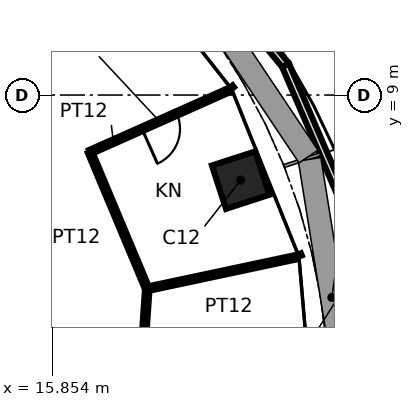
"""IFC4 building model, lengths in metres.
Left out: names, types, materials, properties, quantities, classifications, styles, units other than length and angle.
Written with IfcOpenShell. Run it as: python <this file> out.ifc"""

import sys

from ifc_helpers import new_model, si_unit, direction, frame, frame_2d, origin, origin_2d, place, context, subcontext, project, spatial, rectangle, extrude, element, fill, save


model = new_model("IFC4")
c1 = context("Model", 3, precision=1e-05, world=origin(), true_north=direction((0.0, 1.0)))
c2 = subcontext(c1, "Body", "Model", "MODEL_VIEW")
j1 = project(units=[si_unit("LENGTHUNIT", "METRE"), si_unit("PLANEANGLEUNIT", "RADIAN")], contexts=[c1])
p1 = place(None, origin())
s1 = spatial("IfcSite", under=j1, at=p1, CompositionType="ELEMENT")
p2 = place(p1, origin())
s2 = spatial("IfcBuilding", under=s1, at=p2, CompositionType="ELEMENT")
p3 = place(p2, frame((0.0, 0.0, 251.8)))
s3 = spatial("IfcBuildingStorey", under=s2, at=p3, CompositionType="ELEMENT", Elevation=251.8)
p4 = place(p3, frame((20.808, 6.761, 0.0), z_axis=(0.0, 0.0, 1.0), x_axis=(0.951056516295, 0.309016994375, 0.0)))
e1 = element("IfcColumn", 1, at=p4, inside=s3, PredefinedType="COLUMN", context=c2, shape_type="SweptSolid", body=[
    extrude(rectangle(XDim=1.2, YDim=1.2, at=origin_2d()), origin(), (0.0, 0.0, 1.0), 4.2),
])
p5 = place(p3, frame((24.004, 5.102, 0.0), z_axis=(0.0, 0.0, 1.0), x_axis=(-0.3953624821, 0.918525180791, 0.0)))
e2 = element("IfcWall", 2, at=p5, inside=s3, PredefinedType="PARAPET", context=c2, shape_type="SweptSolid", body=[
    extrude(rectangle(XDim=5.103, YDim=0.2, at=frame_2d((2.551, 0.0))), origin(), (0.0, 0.0, 1.0), 1.1),
])
p6 = place(p3, frame((21.986, 9.789, 0.0), z_axis=(0.0, 0.0, 1.0), x_axis=(-0.63611342946, 0.771595557829, 0.0)))
e3 = element("IfcWall", 3, at=p6, inside=s3, PredefinedType="PARAPET", context=c2, shape_type="SweptSolid", body=[
    extrude(rectangle(XDim=5.013, YDim=0.2, at=frame_2d((2.507, 0.0))), origin(), (0.0, 0.0, 1.0), 1.1),
])
p7 = place(p3, frame((18.351, 3.901, 0.0), z_axis=(0.0, 0.0, 1.0), x_axis=(-0.068390063315, -0.99765865868, 0.0)))
e4 = element("IfcWall", 4, at=p7, inside=s3, PredefinedType="PARTITIONING", context=c2, shape_type="SweptSolid", body=[
    extrude(rectangle(XDim=7.707, YDim=0.12, at=frame_2d((3.854, 0.0))), origin(), (0.0, 0.0, 1.0), 4.04),
])
p8 = place(p7, frame((3.354, 0.0, 0.0)))
e5 = element("IfcOpeningElement", 5, at=p8, cuts=e4, PredefinedType="OPENING", context=c2, shape_type="SweptSolid", body=[
    extrude(rectangle(XDim=1.0, YDim=2.4, at=frame_2d((0.5, 1.2))), frame((0.0, 0.07, 0.0), z_axis=(0.0, -1.0, 0.0), x_axis=(1.0, 0.0, 0.0)), (0.0, 0.0, 1.0), 0.14),
])
p9 = place(p3, frame((18.351, 3.901, 0.0), z_axis=(0.0, 0.0, 1.0), x_axis=(0.978140543132, 0.207944891454, 0.0)))
e6 = element("IfcWall", 6, at=p9, inside=s3, PredefinedType="PARTITIONING", context=c2, shape_type="SweptSolid", body=[
    extrude(rectangle(XDim=4.0, YDim=0.12, at=frame_2d((2.0, 0.0))), origin(), (0.0, 0.0, 1.0), 4.04),
])
p10 = place(p3, frame((16.842, 7.499, 0.0), z_axis=(0.0, 0.0, 1.0), x_axis=(0.38675585774, -0.922182143887, 0.0)))
e7 = element("IfcWall", 7, at=p10, inside=s3, PredefinedType="PARTITIONING", context=c2, shape_type="SweptSolid", body=[
    extrude(rectangle(XDim=3.902, YDim=0.12, at=frame_2d((1.951, 0.0))), origin(), (0.0, 0.0, 1.0), 4.04),
])
p11 = place(p3, frame((20.497, 9.126, 0.0), z_axis=(0.0, 0.0, 1.0), x_axis=(-0.913549606868, -0.406727323635, 0.0)))
e8 = element("IfcWall", 8, at=p11, inside=s3, PredefinedType="PARTITIONING", context=c2, shape_type="SweptSolid", body=[
    extrude(rectangle(XDim=4.0, YDim=0.12, at=frame_2d((2.0, 0.0))), origin(), (0.0, 0.0, 1.0), 4.04),
])
p12 = place(p11, frame((1.5, 0.0, 0.0)))
e9 = element("IfcOpeningElement", 9, at=p12, cuts=e8, PredefinedType="OPENING", context=c2, shape_type="SweptSolid", body=[
    extrude(rectangle(XDim=1.0, YDim=2.4, at=frame_2d((0.5, 1.2))), frame((0.0, 0.07, 0.0), z_axis=(0.0, -1.0, 0.0), x_axis=(1.0, 0.0, 0.0)), (0.0, 0.0, 1.0), 0.14),
])
p13 = place(p12, origin())
e10 = element("IfcDoor", 10, at=p13, inside=s3, OperationType="SINGLE_SWING_RIGHT", PredefinedType="DOOR", context=c2, shape_type="SweptSolid", body=[
    extrude(rectangle(XDim=1.0, YDim=2.4, at=frame_2d((0.5, 1.2))), frame((0.0, 0.025, 0.0), z_axis=(0.0, -1.0, 0.0), x_axis=(1.0, 0.0, 0.0)), (0.0, 0.0, 1.0), 0.05),
])
fill(e9, e10)
save(model, sys.argv[1])
